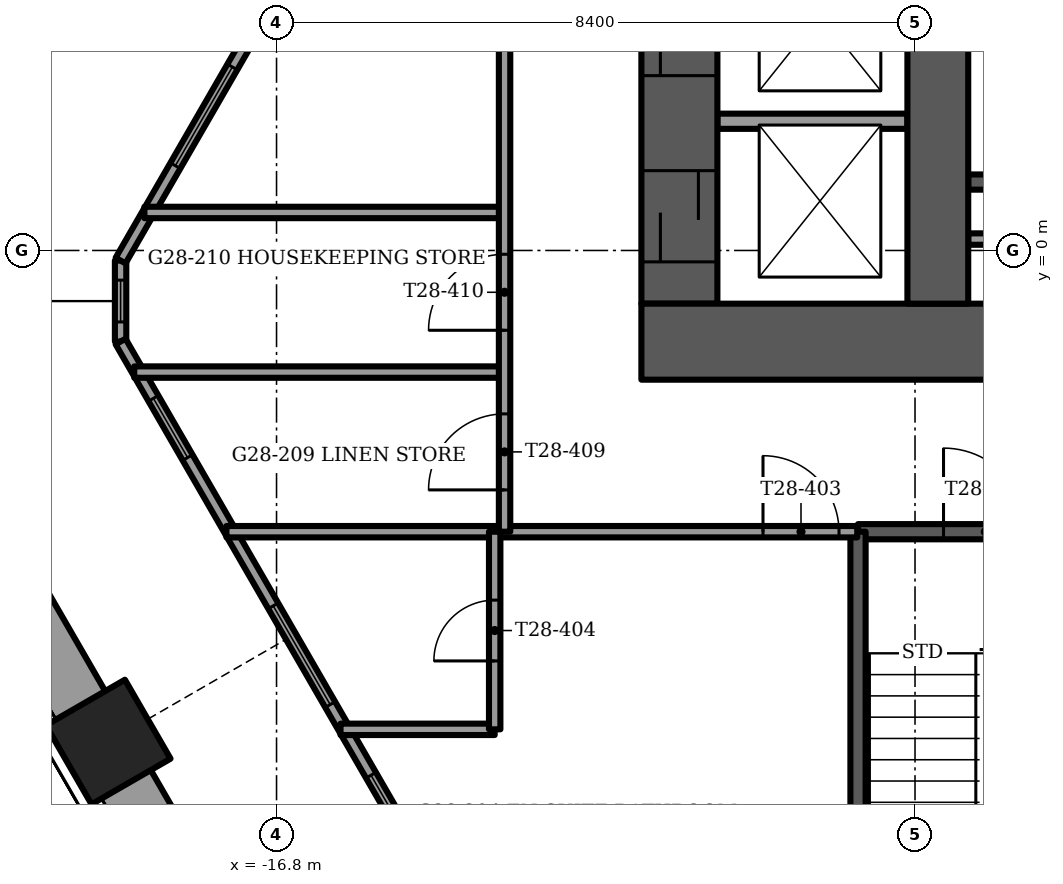
"""IFC4 building model, lengths in metres.
Left out: names, types, materials, properties, quantities, classifications, styles, units other than length and angle.
Written with IfcOpenShell. Run it as: python <this file> out.ifc"""

import sys

from ifc_helpers import new_model, si_unit, direction, frame, frame_2d, origin, origin_2d, place, context, subcontext, project, spatial, rectangle, extrude, element, fill, save


model = new_model("IFC4")
c1 = context("Model", 3, precision=1e-05, world=origin(), true_north=direction((0.0, 1.0)))
c2 = subcontext(c1, "Body", "Model", "MODEL_VIEW")
j1 = project(units=[si_unit("LENGTHUNIT", "METRE"), si_unit("PLANEANGLEUNIT", "RADIAN")], contexts=[c1])
p1 = place(None, origin())
s1 = spatial("IfcSite", under=j1, at=p1, CompositionType="ELEMENT")
p2 = place(p1, origin())
s2 = spatial("IfcBuilding", under=s1, at=p2, CompositionType="ELEMENT")
p3 = place(p2, frame((0.0, 0.0, 116.0)))
s3 = spatial("IfcBuildingStorey", under=s2, at=p3, CompositionType="ELEMENT", Elevation=116.0)
p4 = place(p3, frame((-19.014, -6.467, -1.2), z_axis=(0.0, 0.0, 1.0), x_axis=(-0.5, 0.866025403784, 0.0)))
e1 = element("IfcColumn", 1, at=p4, inside=s3, PredefinedType="COLUMN", context=c2, shape_type="SweptSolid", body=[
    extrude(rectangle(XDim=1.2, YDim=1.2, at=origin_2d()), origin(), (0.0, 0.0, 1.0), 3.75),
])
p5 = place(p3, frame((-12.0, -1.2, -0.3), z_axis=(0.0, 0.0, 1.0), x_axis=(1.0, 0.0, 0.0)))
e2 = element("IfcWall", 2, at=p5, inside=s3, PredefinedType="SHEAR", context=c2, shape_type="SweptSolid", body=[
    extrude(rectangle(XDim=24.0, YDim=1.0, at=frame_2d((12.0, 0.0))), origin(), (0.0, 0.0, 1.0), 3.75),
])
p6 = place(p5, frame((11.2, 0.0, 0.0)))
e3 = element("IfcOpeningElement", 3, at=p6, cuts=e2, PredefinedType="OPENING", context=c2, shape_type="SweptSolid", body=[
    extrude(rectangle(XDim=1.6, YDim=2.1, at=frame_2d((0.8, 1.05))), frame((0.0, 0.5, 0.0), z_axis=(0.0, -1.0, 0.0), x_axis=(1.0, 0.0, 0.0)), (0.0, 0.0, 1.0), 1.0),
])
p7 = place(p3, frame((-8.1, -0.7, -0.3), z_axis=(0.0, 0.0, 1.0), x_axis=(0.0, 1.0, 0.0)))
e4 = element("IfcWall", 4, at=p7, inside=s3, PredefinedType="SHEAR", context=c2, shape_type="SweptSolid", body=[
    extrude(rectangle(XDim=9.4, YDim=0.8, at=frame_2d((4.7, 0.0))), origin(), (0.0, 0.0, 1.0), 3.75),
])
p8 = place(p7, frame((7.95, 0.0, 0.0)))
e5 = element("IfcOpeningElement", 5, at=p8, cuts=e4, PredefinedType="OPENING", context=c2, shape_type="SweptSolid", body=[
    extrude(rectangle(XDim=1.1, YDim=2.1, at=frame_2d((0.55, 1.05))), frame((0.0, 0.4, 0.0), z_axis=(0.0, -1.0, 0.0), x_axis=(1.0, 0.0, 0.0)), (0.0, 0.0, 1.0), 0.8),
])
p9 = place(p3, frame((-11.5, -0.7, -0.3), z_axis=(0.0, 0.0, 1.0), x_axis=(0.0, 1.0, 0.0)))
e6 = element("IfcWall", 6, at=p9, inside=s3, PredefinedType="SHEAR", context=c2, shape_type="SweptSolid", body=[
    extrude(rectangle(XDim=9.4, YDim=1.0, at=frame_2d((4.7, 0.0))), origin(), (0.0, 0.0, 1.0), 3.75),
])
p10 = place(p9, frame((8.15, 0.0, 0.0)))
e7 = element("IfcOpeningElement", 7, at=p10, cuts=e6, PredefinedType="OPENING", context=c2, shape_type="SweptSolid", body=[
    extrude(rectangle(XDim=1.1, YDim=2.1, at=frame_2d((0.55, 1.05))), frame((0.0, 0.5, 0.0), z_axis=(0.0, -1.0, 0.0), x_axis=(1.0, 0.0, 0.0)), (0.0, 0.0, 1.0), 1.0),
])
p11 = place(p9, frame((0.55, 0.0, 0.0)))
e8 = element("IfcOpeningElement", 8, at=p11, cuts=e6, PredefinedType="OPENING", context=c2, shape_type="SweptSolid", body=[
    extrude(rectangle(XDim=1.2, YDim=2.1, at=frame_2d((0.6, 1.05))), frame((0.0, 0.5, 0.0), z_axis=(0.0, -1.0, 0.0), x_axis=(1.0, 0.0, 0.0)), (0.0, 0.0, 1.0), 1.0),
])
p12 = place(p9, frame((3.0, 0.0, 0.0)))
e9 = element("IfcOpeningElement", 9, at=p12, cuts=e6, PredefinedType="OPENING", context=c2, shape_type="SweptSolid", body=[
    extrude(rectangle(XDim=1.2, YDim=2.1, at=frame_2d((0.6, 1.05))), frame((0.0, 0.5, 0.0), z_axis=(0.0, -1.0, 0.0), x_axis=(1.0, 0.0, 0.0)), (0.0, 0.0, 1.0), 1.0),
])
p13 = place(p3, frame((-18.853, 5.715, 0.0), z_axis=(0.0, 0.0, 1.0), x_axis=(-0.500012951941, -0.866017925849, 0.0)))
e10 = element("IfcWall", 10, at=p13, inside=s3, PredefinedType="PARAPET", context=c2, shape_type="SweptSolid", body=[
    extrude(rectangle(XDim=6.717, YDim=0.9, at=frame_2d((3.358, 0.0))), origin(), (0.0, 0.0, 1.0), 1.1),
])
p14 = place(p3, frame((-22.211, -1.229, 0.0), z_axis=(0.0, 0.0, 1.0), x_axis=(0.49998957009, -0.866031425412, 0.0)))
e11 = element("IfcWall", 11, at=p14, inside=s3, PredefinedType="PARAPET", context=c2, shape_type="SweptSolid", body=[
    extrude(rectangle(XDim=5.564, YDim=0.9, at=frame_2d((2.782, 0.0))), origin(), (0.0, 0.0, 1.0), 1.1),
])
p15 = place(p3, frame((-18.859, -7.035, 0.0), z_axis=(0.0, 0.0, 1.0), x_axis=(0.499999023957, -0.866025967302, 0.0)))
e12 = element("IfcWall", 12, at=p15, inside=s3, PredefinedType="PARAPET", context=c2, shape_type="SweptSolid", body=[
    extrude(rectangle(XDim=6.673, YDim=0.9, at=frame_2d((3.337, 0.0))), origin(), (0.0, 0.0, 1.0), 1.1),
])
p16 = place(p3, frame((-7.925, 18.792, 0.0), z_axis=(0.0, 0.0, 1.0), x_axis=(-0.499994842654, -0.866028381359, 0.0)))
e13 = element("IfcWall", 13, at=p16, inside=s3, PredefinedType="SOLIDWALL", context=c2, shape_type="SweptSolid", body=[
    extrude(rectangle(XDim=21.853, YDim=0.15, at=frame_2d((10.927, 0.0))), origin(), (0.0, 0.0, 1.0), 3.45),
])
p17 = place(p16, frame((4.293, 0.0, 0.15)))
e14 = element("IfcOpeningElement", 14, at=p17, cuts=e13, PredefinedType="OPENING", context=c2, shape_type="SweptSolid", body=[
    extrude(rectangle(XDim=0.9, YDim=2.85, at=frame_2d((0.45, 1.425))), frame((0.0, 0.075, 0.0), z_axis=(0.0, -1.0, 0.0), x_axis=(1.0, 0.0, 0.0)), (0.0, 0.0, 1.0), 0.15),
])
p18 = place(p16, frame((8.412, 0.0, 0.15)))
e15 = element("IfcOpeningElement", 15, at=p18, cuts=e13, PredefinedType="OPENING", context=c2, shape_type="SweptSolid", body=[
    extrude(rectangle(XDim=0.9, YDim=2.85, at=frame_2d((0.45, 1.425))), frame((0.0, 0.075, 0.0), z_axis=(0.0, -1.0, 0.0), x_axis=(1.0, 0.0, 0.0)), (0.0, 0.0, 1.0), 0.15),
])
p19 = place(p16, frame((12.612, 0.0, 0.15)))
e16 = element("IfcOpeningElement", 16, at=p19, cuts=e13, PredefinedType="OPENING", context=c2, shape_type="SweptSolid", body=[
    extrude(rectangle(XDim=1.7, YDim=2.85, at=frame_2d((0.85, 1.425))), frame((0.0, 0.075, 0.0), z_axis=(0.0, -1.0, 0.0), x_axis=(1.0, 0.0, 0.0)), (0.0, 0.0, 1.0), 0.15),
])
p20 = place(p16, frame((14.712, 0.0, 0.15)))
e17 = element("IfcOpeningElement", 17, at=p20, cuts=e13, PredefinedType="OPENING", context=c2, shape_type="SweptSolid", body=[
    extrude(rectangle(XDim=1.5, YDim=2.85, at=frame_2d((0.75, 1.425))), frame((0.0, 0.075, 0.0), z_axis=(0.0, -1.0, 0.0), x_axis=(1.0, 0.0, 0.0)), (0.0, 0.0, 1.0), 0.15),
])
p21 = place(p16, frame((16.812, 0.0, 0.15)))
e18 = element("IfcOpeningElement", 18, at=p21, cuts=e13, PredefinedType="OPENING", context=c2, shape_type="SweptSolid", body=[
    extrude(rectangle(XDim=1.7, YDim=2.85, at=frame_2d((0.85, 1.425))), frame((0.0, 0.075, 0.0), z_axis=(0.0, -1.0, 0.0), x_axis=(1.0, 0.0, 0.0)), (0.0, 0.0, 1.0), 0.15),
])
p22 = place(p16, frame((18.912, 0.0, 0.15)))
e19 = element("IfcOpeningElement", 19, at=p22, cuts=e13, PredefinedType="OPENING", context=c2, shape_type="SweptSolid", body=[
    extrude(rectangle(XDim=1.5, YDim=2.85, at=frame_2d((0.75, 1.425))), frame((0.0, 0.075, 0.0), z_axis=(0.0, -1.0, 0.0), x_axis=(1.0, 0.0, 0.0)), (0.0, 0.0, 1.0), 0.15),
])
p23 = place(p16, frame((1.022, 0.0, 0.15)))
e20 = element("IfcOpeningElement", 20, at=p23, cuts=e13, PredefinedType="OPENING", context=c2, shape_type="SweptSolid", body=[
    extrude(rectangle(XDim=1.7, YDim=2.73, at=frame_2d((0.85, 1.365))), frame((0.0, 0.075, 0.0), z_axis=(0.0, -1.0, 0.0), x_axis=(1.0, 0.0, 0.0)), (0.0, 0.0, 1.0), 0.15),
])
p24 = place(p3, frame((-18.852, -1.198, 0.0), z_axis=(0.0, 0.0, 1.0), x_axis=(0.499992448691, -0.866029763491, 0.0)))
e21 = element("IfcWall", 21, at=p24, inside=s3, PredefinedType="SOLIDWALL", context=c2, shape_type="SweptSolid", body=[
    extrude(rectangle(XDim=16.777, YDim=0.15, at=frame_2d((8.388, 0.0))), origin(), (0.0, 0.0, 1.0), 3.45),
])
p25 = place(p24, frame((4.015, 0.0, 0.15)))
e22 = element("IfcOpeningElement", 22, at=p25, cuts=e21, PredefinedType="OPENING", context=c2, shape_type="SweptSolid", body=[
    extrude(rectangle(XDim=1.5, YDim=2.85, at=frame_2d((0.75, 1.425))), frame((0.0, 0.075, 0.0), z_axis=(0.0, -1.0, 0.0), x_axis=(1.0, 0.0, 0.0)), (0.0, 0.0, 1.0), 0.15),
])
p26 = place(p24, frame((6.588, 0.0, 0.15)))
e23 = element("IfcOpeningElement", 23, at=p26, cuts=e21, PredefinedType="OPENING", context=c2, shape_type="SweptSolid", body=[
    extrude(rectangle(XDim=1.7, YDim=2.85, at=frame_2d((0.85, 1.425))), frame((0.0, 0.075, 0.0), z_axis=(0.0, -1.0, 0.0), x_axis=(1.0, 0.0, 0.0)), (0.0, 0.0, 1.0), 0.15),
])
p27 = place(p24, frame((8.688, 0.0, 0.0)))
e24 = element("IfcOpeningElement", 24, at=p27, cuts=e21, PredefinedType="OPENING", context=c2, shape_type="SweptSolid", body=[
    extrude(rectangle(XDim=1.5, YDim=2.4, at=frame_2d((0.75, 1.2))), frame((0.0, 0.075, 0.0), z_axis=(0.0, -1.0, 0.0), x_axis=(1.0, 0.0, 0.0)), (0.0, 0.0, 1.0), 0.15),
])
p28 = place(p24, frame((10.788, 0.0, 0.15)))
e25 = element("IfcOpeningElement", 25, at=p28, cuts=e21, PredefinedType="OPENING", context=c2, shape_type="SweptSolid", body=[
    extrude(rectangle(XDim=1.7, YDim=2.85, at=frame_2d((0.85, 1.425))), frame((0.0, 0.075, 0.0), z_axis=(0.0, -1.0, 0.0), x_axis=(1.0, 0.0, 0.0)), (0.0, 0.0, 1.0), 0.15),
])
p29 = place(p24, frame((12.888, 0.0, 0.0)))
e26 = element("IfcOpeningElement", 26, at=p29, cuts=e21, PredefinedType="OPENING", context=c2, shape_type="SweptSolid", body=[
    extrude(rectangle(XDim=1.5, YDim=2.4, at=frame_2d((0.75, 1.2))), frame((0.0, 0.075, 0.0), z_axis=(0.0, -1.0, 0.0), x_axis=(1.0, 0.0, 0.0)), (0.0, 0.0, 1.0), 0.15),
])
p30 = place(p24, frame((0.863, 0.0, 0.15)))
e27 = element("IfcOpeningElement", 27, at=p30, cuts=e21, PredefinedType="OPENING", context=c2, shape_type="SweptSolid", body=[
    extrude(rectangle(XDim=0.9, YDim=2.73, at=frame_2d((0.45, 1.365))), frame((0.0, 0.075, 0.0), z_axis=(0.0, -1.0, 0.0), x_axis=(1.0, 0.0, 0.0)), (0.0, 0.0, 1.0), 0.15),
])
p31 = place(p24, frame((15.333, 0.0, 0.15)))
e28 = element("IfcOpeningElement", 28, at=p31, cuts=e21, PredefinedType="OPENING", context=c2, shape_type="SweptSolid", body=[
    extrude(rectangle(XDim=0.9, YDim=2.73, at=frame_2d((0.45, 1.365))), frame((0.0, 0.075, 0.0), z_axis=(0.0, -1.0, 0.0), x_axis=(1.0, 0.0, 0.0)), (0.0, 0.0, 1.0), 0.15),
])
p32 = place(p3, frame((-18.852, -0.133, 0.0), z_axis=(0.0, 0.0, 1.0), x_axis=(0.0, -1.0, 0.0)))
e29 = element("IfcWall", 29, at=p32, inside=s3, PredefinedType="SOLIDWALL", context=c2, shape_type="SweptSolid", body=[
    extrude(rectangle(XDim=1.065, YDim=0.15, at=frame_2d((0.532, 0.0))), origin(), (0.0, 0.0, 1.0), 3.45),
])
p33 = place(p32, frame((0.258, 0.0, 0.15)))
e30 = element("IfcOpeningElement", 30, at=p33, cuts=e29, PredefinedType="OPENING", context=c2, shape_type="SweptSolid", body=[
    extrude(rectangle(XDim=0.55, YDim=2.85, at=frame_2d((0.275, 1.425))), frame((0.0, 0.075, 0.0), z_axis=(0.0, -1.0, 0.0), x_axis=(1.0, 0.0, 0.0)), (0.0, 0.0, 1.0), 0.15),
])
p34 = place(p3, frame((-7.7, 0.9, -0.3), z_axis=(0.0, 0.0, 1.0), x_axis=(1.0, 0.0, 0.0)))
e31 = element("IfcWall", 31, at=p34, inside=s3, PredefinedType="SOLIDWALL", context=c2, shape_type="SweptSolid", body=[
    extrude(rectangle(XDim=3.25, YDim=0.2, at=frame_2d((1.625, 0.0))), origin(), (0.0, 0.0, 1.0), 3.75),
])
p35 = place(p3, frame((-7.7, 0.15, 0.0), z_axis=(0.0, 0.0, 1.0), x_axis=(1.0, 0.0, 0.0)))
e32 = element("IfcWall", 32, at=p35, inside=s3, PredefinedType="PARTITIONING", context=c2, shape_type="SweptSolid", body=[
    extrude(rectangle(XDim=3.9, YDim=0.15, at=frame_2d((1.95, 0.0))), origin(), (0.0, 0.0, 1.0), 3.45),
])
p36 = place(p3, frame((-9.15, -3.7, -0.3), z_axis=(0.0, 0.0, 1.0), x_axis=(1.0, 0.0, 0.0)))
e33 = element("IfcWall", 33, at=p36, inside=s3, PredefinedType="SOLIDWALL", context=c2, shape_type="SweptSolid", body=[
    extrude(rectangle(XDim=3.35, YDim=0.2, at=frame_2d((1.675, 0.0))), origin(), (0.0, 0.0, 1.0), 3.75),
])
p37 = place(p36, frame((1.125, 0.0, 0.0)))
e34 = element("IfcOpeningElement", 34, at=p37, cuts=e33, PredefinedType="OPENING", context=c2, shape_type="SweptSolid", body=[
    extrude(rectangle(XDim=1.1, YDim=2.1, at=frame_2d((0.55, 1.05))), frame((0.0, 0.1, 0.0), z_axis=(0.0, -1.0, 0.0), x_axis=(1.0, 0.0, 0.0)), (0.0, 0.0, 1.0), 0.2),
])
p38 = place(p3, frame((-9.15, -3.7, -0.3), z_axis=(0.0, 0.0, 1.0), x_axis=(0.0, -1.0, 0.0)))
e35 = element("IfcWall", 35, at=p38, inside=s3, PredefinedType="SOLIDWALL", context=c2, shape_type="SweptSolid", body=[
    extrude(rectangle(XDim=7.7, YDim=0.2, at=frame_2d((3.85, 0.0))), origin(), (0.0, 0.0, 1.0), 3.75),
])
p39 = place(p3, frame((-11.0, 1.7, 0.0), z_axis=(0.0, 0.0, 1.0), x_axis=(1.0, 0.0, 0.0)))
e36 = element("IfcWall", 36, at=p39, inside=s3, PredefinedType="PARTITIONING", context=c2, shape_type="SweptSolid", body=[
    extrude(rectangle(XDim=2.5, YDim=0.2, at=frame_2d((1.25, 0.0))), origin(), (0.0, 0.0, 1.0), 3.45),
])
p40 = place(p3, frame((-15.958, -6.3, 0.0), z_axis=(0.0, 0.0, 1.0), x_axis=(1.0, 0.0, 0.0)))
e37 = element("IfcWall", 37, at=p40, inside=s3, PredefinedType="PARTITIONING", context=c2, shape_type="SweptSolid", body=[
    extrude(rectangle(XDim=2.028, YDim=0.15, at=frame_2d((1.014, 0.0))), origin(), (0.0, 0.0, 1.0), 3.45),
])
p41 = place(p3, frame((-17.459, -3.7, 0.0), z_axis=(0.0, 0.0, 1.0), x_axis=(1.0, 0.0, 0.0)))
e38 = element("IfcWall", 38, at=p41, inside=s3, PredefinedType="PARTITIONING", context=c2, shape_type="SweptSolid", body=[
    extrude(rectangle(XDim=8.299, YDim=0.15, at=frame_2d((4.149, 0.0))), origin(), (0.0, 0.0, 1.0), 3.45),
])
p42 = place(p41, frame((7.059, 0.0, 0.0)))
e39 = element("IfcOpeningElement", 39, at=p42, cuts=e38, PredefinedType="OPENING", context=c2, shape_type="SweptSolid", body=[
    extrude(rectangle(XDim=1.0, YDim=2.1, at=frame_2d((0.5, 1.05))), frame((0.0, 0.075, 0.0), z_axis=(0.0, -1.0, 0.0), x_axis=(1.0, 0.0, 0.0)), (0.0, 0.0, 1.0), 0.15),
])
p43 = place(p3, frame((-18.672, -1.6, 0.0), z_axis=(0.0, 0.0, 1.0), x_axis=(1.0, 0.0, 0.0)))
e40 = element("IfcWall", 40, at=p43, inside=s3, PredefinedType="PARTITIONING", context=c2, shape_type="SweptSolid", body=[
    extrude(rectangle(XDim=4.872, YDim=0.15, at=frame_2d((2.436, 0.0))), origin(), (0.0, 0.0, 1.0), 3.45),
])
p44 = place(p3, frame((-18.538, 0.5, 0.0), z_axis=(0.0, 0.0, 1.0), x_axis=(1.0, 0.0, 0.0)))
e41 = element("IfcWall", 41, at=p44, inside=s3, PredefinedType="PARTITIONING", context=c2, shape_type="SweptSolid", body=[
    extrude(rectangle(XDim=4.738, YDim=0.15, at=frame_2d((2.369, 0.0))), origin(), (0.0, 0.0, 1.0), 3.45),
])
p45 = place(p3, frame((-13.8, -3.7, 0.0), z_axis=(0.0, 0.0, 1.0), x_axis=(0.0, 1.0, 0.0)))
e42 = element("IfcWall", 42, at=p45, inside=s3, PredefinedType="PARTITIONING", context=c2, shape_type="SweptSolid", body=[
    extrude(rectangle(XDim=12.407, YDim=0.15, at=frame_2d((6.204, 0.0))), origin(), (0.0, 0.0, 1.0), 3.45),
])
p46 = place(p45, frame((0.55, 0.0, 0.0)))
e43 = element("IfcOpeningElement", 43, at=p46, cuts=e42, PredefinedType="OPENING", context=c2, shape_type="SweptSolid", body=[
    extrude(rectangle(XDim=1.0, YDim=2.1, at=frame_2d((0.5, 1.05))), frame((0.0, 0.075, 0.0), z_axis=(0.0, -1.0, 0.0), x_axis=(1.0, 0.0, 0.0)), (0.0, 0.0, 1.0), 0.15),
])
p47 = place(p45, frame((2.65, 0.0, 0.0)))
e44 = element("IfcOpeningElement", 44, at=p47, cuts=e42, PredefinedType="OPENING", context=c2, shape_type="SweptSolid", body=[
    extrude(rectangle(XDim=1.0, YDim=2.1, at=frame_2d((0.5, 1.05))), frame((0.0, 0.075, 0.0), z_axis=(0.0, -1.0, 0.0), x_axis=(1.0, 0.0, 0.0)), (0.0, 0.0, 1.0), 0.15),
])
p48 = place(p45, frame((7.683, 0.0, 0.0)))
e45 = element("IfcOpeningElement", 45, at=p48, cuts=e42, PredefinedType="OPENING", context=c2, shape_type="SweptSolid", body=[
    extrude(rectangle(XDim=1.0, YDim=2.1, at=frame_2d((0.5, 1.05))), frame((0.0, 0.075, 0.0), z_axis=(0.0, -1.0, 0.0), x_axis=(1.0, 0.0, 0.0)), (0.0, 0.0, 1.0), 0.15),
])
p49 = place(p3, frame((-13.93, -6.3, 0.0), z_axis=(0.0, 0.0, 1.0), x_axis=(0.0, 1.0, 0.0)))
e46 = element("IfcWall", 46, at=p49, inside=s3, PredefinedType="PARTITIONING", context=c2, shape_type="SweptSolid", body=[
    extrude(rectangle(XDim=2.6, YDim=0.15, at=frame_2d((1.3, 0.0))), origin(), (0.0, 0.0, 1.0), 3.45),
])
p50 = place(p49, frame((0.9, 0.0, 0.0)))
e47 = element("IfcOpeningElement", 47, at=p50, cuts=e46, PredefinedType="OPENING", context=c2, shape_type="SweptSolid", body=[
    extrude(rectangle(XDim=0.8, YDim=2.1, at=frame_2d((0.4, 1.05))), frame((0.0, 0.075, 0.0), z_axis=(0.0, -1.0, 0.0), x_axis=(1.0, 0.0, 0.0)), (0.0, 0.0, 1.0), 0.15),
])
p51 = place(p22, origin())
e48 = element("IfcWindow", 48, at=p51, inside=s3, PartitioningType="SINGLE_PANEL", PredefinedType="WINDOW", context=c2, shape_type="SweptSolid", body=[
    extrude(rectangle(XDim=1.5, YDim=2.85, at=frame_2d((0.75, 1.425))), frame((0.0, 0.03, 0.0), z_axis=(0.0, -1.0, 0.0), x_axis=(1.0, 0.0, 0.0)), (0.0, 0.0, 1.0), 0.06),
])
fill(e19, e48)
p52 = place(p25, origin())
e49 = element("IfcWindow", 49, at=p52, inside=s3, PartitioningType="SINGLE_PANEL", PredefinedType="WINDOW", context=c2, shape_type="SweptSolid", body=[
    extrude(rectangle(XDim=1.5, YDim=2.85, at=frame_2d((0.75, 1.425))), frame((0.0, 0.03, 0.0), z_axis=(0.0, -1.0, 0.0), x_axis=(1.0, 0.0, 0.0)), (0.0, 0.0, 1.0), 0.06),
])
fill(e22, e49)
p53 = place(p26, origin())
e50 = element("IfcWindow", 50, at=p53, inside=s3, PartitioningType="SINGLE_PANEL", PredefinedType="WINDOW", context=c2, shape_type="SweptSolid", body=[
    extrude(rectangle(XDim=1.7, YDim=2.85, at=frame_2d((0.85, 1.425))), frame((0.0, 0.03, 0.0), z_axis=(0.0, -1.0, 0.0), x_axis=(1.0, 0.0, 0.0)), (0.0, 0.0, 1.0), 0.06),
])
fill(e23, e50)
p54 = place(p30, origin())
e51 = element("IfcWindow", 51, at=p54, inside=s3, PartitioningType="SINGLE_PANEL", PredefinedType="WINDOW", context=c2, shape_type="SweptSolid", body=[
    extrude(rectangle(XDim=0.9, YDim=2.73, at=frame_2d((0.45, 1.365))), frame((0.0, 0.03, 0.0), z_axis=(0.0, -1.0, 0.0), x_axis=(1.0, 0.0, 0.0)), (0.0, 0.0, 1.0), 0.06),
])
fill(e27, e51)
p55 = place(p33, origin())
e52 = element("IfcWindow", 52, at=p55, inside=s3, PartitioningType="SINGLE_PANEL", PredefinedType="WINDOW", context=c2, shape_type="SweptSolid", body=[
    extrude(rectangle(XDim=0.55, YDim=2.85, at=frame_2d((0.275, 1.425))), frame((0.0, 0.03, 0.0), z_axis=(0.0, -1.0, 0.0), x_axis=(1.0, 0.0, 0.0)), (0.0, 0.0, 1.0), 0.06),
])
fill(e30, e52)
p56 = place(p37, origin())
e53 = element("IfcDoor", 53, at=p56, inside=s3, OperationType="SINGLE_SWING_LEFT", PredefinedType="DOOR", context=c2, shape_type="SweptSolid", body=[
    extrude(rectangle(XDim=1.1, YDim=2.1, at=frame_2d((0.55, 1.05))), frame((0.0, 0.025, 0.0), z_axis=(0.0, -1.0, 0.0), x_axis=(1.0, 0.0, 0.0)), (0.0, 0.0, 1.0), 0.05),
])
fill(e34, e53)
p57 = place(p11, origin())
e54 = element("IfcDoor", 54, at=p57, inside=s3, OperationType="SLIDING_TO_LEFT", PredefinedType="DOOR", context=c2, shape_type="SweptSolid", body=[
    extrude(rectangle(XDim=1.2, YDim=2.1, at=frame_2d((0.6, 1.05))), frame((0.0, 0.025, 0.0), z_axis=(0.0, -1.0, 0.0), x_axis=(1.0, 0.0, 0.0)), (0.0, 0.0, 1.0), 0.05),
])
fill(e8, e54)
p58 = place(p12, origin())
e55 = element("IfcDoor", 55, at=p58, inside=s3, OperationType="SLIDING_TO_LEFT", PredefinedType="DOOR", context=c2, shape_type="SweptSolid", body=[
    extrude(rectangle(XDim=1.2, YDim=2.1, at=frame_2d((0.6, 1.05))), frame((0.0, 0.025, 0.0), z_axis=(0.0, -1.0, 0.0), x_axis=(1.0, 0.0, 0.0)), (0.0, 0.0, 1.0), 0.05),
])
fill(e9, e55)
p59 = place(p42, origin())
e56 = element("IfcDoor", 56, at=p59, inside=s3, OperationType="SINGLE_SWING_RIGHT", PredefinedType="DOOR", context=c2, shape_type="SweptSolid", body=[
    extrude(rectangle(XDim=1.0, YDim=2.1, at=frame_2d((0.5, 1.05))), frame((0.0, 0.025, 0.0), z_axis=(0.0, -1.0, 0.0), x_axis=(1.0, 0.0, 0.0)), (0.0, 0.0, 1.0), 0.05),
])
fill(e39, e56)
p60 = place(p50, origin())
e57 = element("IfcDoor", 57, at=p60, inside=s3, OperationType="SINGLE_SWING_RIGHT", PredefinedType="DOOR", context=c2, shape_type="SweptSolid", body=[
    extrude(rectangle(XDim=0.8, YDim=2.1, at=frame_2d((0.4, 1.05))), frame((0.0, 0.025, 0.0), z_axis=(0.0, -1.0, 0.0), x_axis=(1.0, 0.0, 0.0)), (0.0, 0.0, 1.0), 0.05),
])
fill(e47, e57)
p61 = place(p46, origin())
e58 = element("IfcDoor", 58, at=p61, inside=s3, OperationType="SINGLE_SWING_LEFT", PredefinedType="DOOR", context=c2, shape_type="SweptSolid", body=[
    extrude(rectangle(XDim=1.0, YDim=2.1, at=frame_2d((0.5, 1.05))), frame((0.0, 0.025, 0.0), z_axis=(0.0, -1.0, 0.0), x_axis=(1.0, 0.0, 0.0)), (0.0, 0.0, 1.0), 0.05),
])
fill(e43, e58)
p62 = place(p47, origin())
e59 = element("IfcDoor", 59, at=p62, inside=s3, OperationType="SINGLE_SWING_LEFT", PredefinedType="DOOR", context=c2, shape_type="SweptSolid", body=[
    extrude(rectangle(XDim=1.0, YDim=2.1, at=frame_2d((0.5, 1.05))), frame((0.0, 0.025, 0.0), z_axis=(0.0, -1.0, 0.0), x_axis=(1.0, 0.0, 0.0)), (0.0, 0.0, 1.0), 0.05),
])
fill(e44, e59)
save(model, sys.argv[1])
